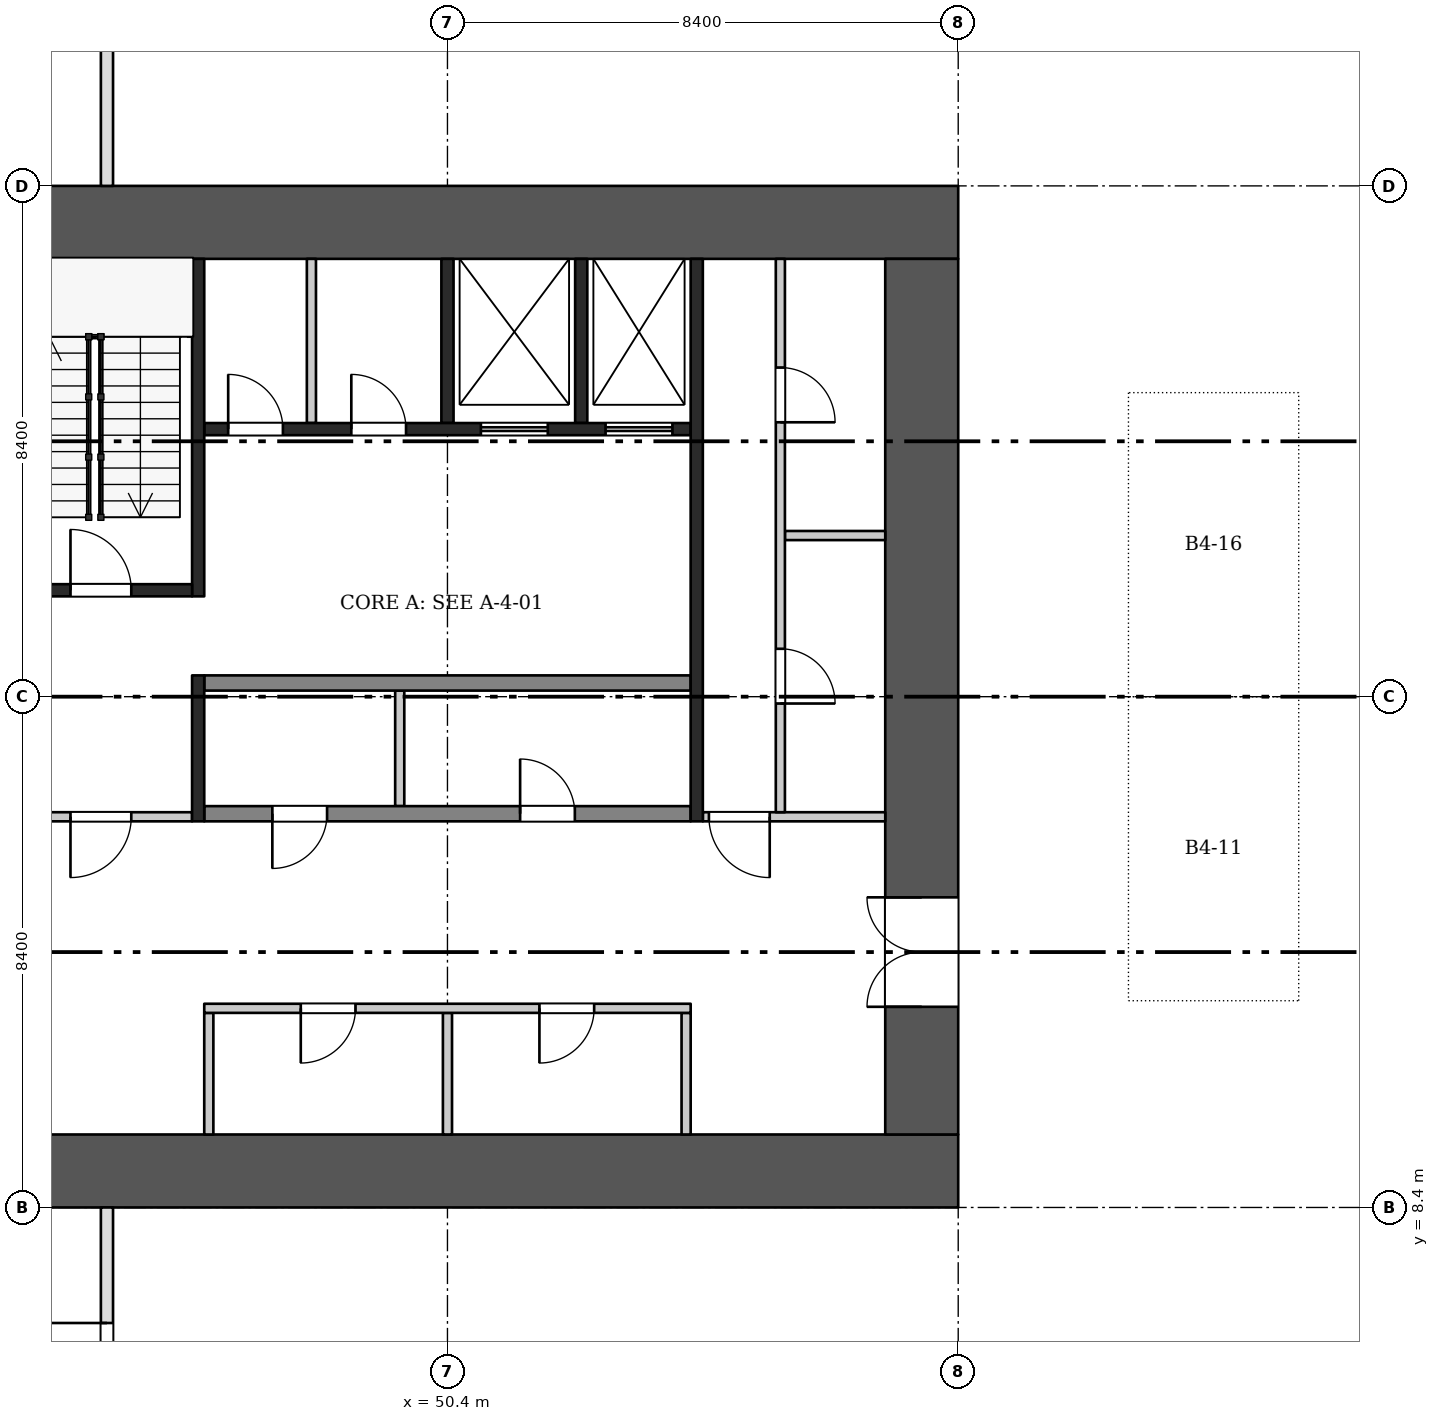
"""IFC4 building model, lengths in metres.
Left out: names, types, materials, properties, quantities, classifications, styles, units other than length and angle.
Written with IfcOpenShell. Run it as: python <this file> out.ifc"""

import sys

from ifc_helpers import new_model, si_unit, direction, frame, frame_2d, origin, place, context, subcontext, project, spatial, rectangle, extrude, element, fill, save


model = new_model("IFC4")
c1 = context("Model", 3, precision=1e-05, world=origin(), true_north=direction((0.0, 1.0)))
c2 = subcontext(c1, "Body", "Model", "MODEL_VIEW")
j1 = project(units=[si_unit("LENGTHUNIT", "METRE"), si_unit("PLANEANGLEUNIT", "RADIAN")], contexts=[c1])
p1 = place(None, origin())
s1 = spatial("IfcSite", under=j1, at=p1, CompositionType="ELEMENT")
p2 = place(p1, origin())
s2 = spatial("IfcBuilding", under=s1, at=p2, CompositionType="ELEMENT")
p3 = place(p2, frame((0.0, 0.0, -16.0)))
s3 = spatial("IfcBuildingStorey", under=s2, at=p3, CompositionType="ELEMENT", Elevation=-16.0)
for number, where, z_axis, x_axis in (
    (1, (42.0, 9.0, 0.0), (0.0, 0.0, 1.0), (1.0, 0.0, 0.0)),
    (2, (42.0, 24.6, 0.0), (0.0, 0.0, 1.0), (1.0, 0.0, 0.0)),
):
    element("IfcWall", number, at=place(p3, frame(where, z_axis=z_axis, x_axis=x_axis)), inside=s3, PredefinedType="SHEAR", context=c2, shape_type="SweptSolid", body=[
        extrude(rectangle(XDim=16.8, YDim=1.2, at=frame_2d((8.4, 0.0))), origin(), (0.0, 0.0, 1.0), 3.7),
    ])
p4 = place(p3, frame((58.2, 9.6, 0.0), z_axis=(0.0, 0.0, 1.0), x_axis=(0.0, 1.0, 0.0)))
e3 = element("IfcWall", 3, at=p4, inside=s3, PredefinedType="SHEAR", context=c2, shape_type="SweptSolid", body=[
    extrude(rectangle(XDim=14.4, YDim=1.2, at=frame_2d((7.2, 0.0))), origin(), (0.0, 0.0, 1.0), 3.7),
])
p5 = place(p4, frame((2.1, 0.0, 0.0)))
e4 = element("IfcOpeningElement", 4, at=p5, cuts=e3, PredefinedType="OPENING", context=c2, shape_type="SweptSolid", body=[
    extrude(rectangle(XDim=1.8, YDim=2.1, at=frame_2d((0.9, 1.05))), frame((0.0, 0.61, 0.0), z_axis=(0.0, -1.0, 0.0), x_axis=(1.0, 0.0, 0.0)), (0.0, 0.0, 1.0), 1.22),
])
for number, where, z_axis, x_axis in (
    (5, (46.475, 9.6, 0.0), (0.0, 0.0, 1.0), (0.0, 1.0, 0.0)),
    (6, (54.325, 9.6, 0.0), (0.0, 0.0, 1.0), (0.0, 1.0, 0.0)),
    (7, (50.4, 9.6, 0.0), (0.0, 0.0, 1.0), (0.0, 1.0, 0.0)),
):
    element("IfcWall", number, at=place(p3, frame(where, z_axis=z_axis, x_axis=x_axis)), inside=s3, PredefinedType="PARTITIONING", context=c2, shape_type="SweptSolid", body=[
        extrude(rectangle(XDim=2.0, YDim=0.15, at=frame_2d((1.0, 0.0))), origin(), (0.0, 0.0, 1.0), 3.7),
    ])
p6 = place(p3, frame((46.4, 11.675, 0.0), z_axis=(0.0, 0.0, 1.0), x_axis=(1.0, 0.0, 0.0)))
e8 = element("IfcWall", 8, at=p6, inside=s3, PredefinedType="PARTITIONING", context=c2, shape_type="SweptSolid", body=[
    extrude(rectangle(XDim=8.0, YDim=0.15, at=frame_2d((4.0, 0.0))), origin(), (0.0, 0.0, 1.0), 3.7),
])
p7 = place(p6, frame((1.587, 0.0, 0.0)))
e9 = element("IfcOpeningElement", 9, at=p7, cuts=e8, PredefinedType="OPENING", context=c2, shape_type="SweptSolid", body=[
    extrude(rectangle(XDim=0.9, YDim=2.1, at=frame_2d((0.45, 1.05))), frame((0.0, 0.085, 0.0), z_axis=(0.0, -1.0, 0.0), x_axis=(1.0, 0.0, 0.0)), (0.0, 0.0, 1.0), 0.17),
])
p8 = place(p6, frame((5.512, 0.0, 0.0)))
e10 = element("IfcOpeningElement", 10, at=p8, cuts=e8, PredefinedType="OPENING", context=c2, shape_type="SweptSolid", body=[
    extrude(rectangle(XDim=0.9, YDim=2.1, at=frame_2d((0.45, 1.05))), frame((0.0, 0.085, 0.0), z_axis=(0.0, -1.0, 0.0), x_axis=(1.0, 0.0, 0.0)), (0.0, 0.0, 1.0), 0.17),
])
p9 = place(p3, frame((49.615, 15.0, 0.0), z_axis=(0.0, 0.0, 1.0), x_axis=(0.0, 1.0, 0.0)))
e11 = element("IfcWall", 11, at=p9, inside=s3, PredefinedType="PARTITIONING", context=c2, shape_type="SweptSolid", body=[
    extrude(rectangle(XDim=1.9, YDim=0.15, at=frame_2d((0.95, 0.0))), origin(), (0.0, 0.0, 1.0), 3.7),
])
p10 = place(p3, frame((46.4, 14.875, 0.0), z_axis=(0.0, 0.0, 1.0), x_axis=(1.0, 0.0, 0.0)))
e12 = element("IfcWall", 12, at=p10, inside=s3, PredefinedType="SHEAR", context=c2, shape_type="SweptSolid", body=[
    extrude(rectangle(XDim=8.0, YDim=0.25, at=frame_2d((4.0, 0.0))), origin(), (0.0, 0.0, 1.0), 3.7),
])
p11 = place(p10, frame((1.12, 0.0, 0.0)))
e13 = element("IfcOpeningElement", 13, at=p11, cuts=e12, PredefinedType="OPENING", context=c2, shape_type="SweptSolid", body=[
    extrude(rectangle(XDim=0.9, YDim=2.1, at=frame_2d((0.45, 1.05))), frame((0.0, 0.135, 0.0), z_axis=(0.0, -1.0, 0.0), x_axis=(1.0, 0.0, 0.0)), (0.0, 0.0, 1.0), 0.27),
])
p12 = place(p10, frame((5.195, 0.0, 0.0)))
e14 = element("IfcOpeningElement", 14, at=p12, cuts=e12, PredefinedType="OPENING", context=c2, shape_type="SweptSolid", body=[
    extrude(rectangle(XDim=0.9, YDim=2.1, at=frame_2d((0.45, 1.05))), frame((0.0, 0.135, 0.0), z_axis=(0.0, -1.0, 0.0), x_axis=(1.0, 0.0, 0.0)), (0.0, 0.0, 1.0), 0.27),
])
p13 = place(p3, frame((46.4, 17.025, 0.0), z_axis=(0.0, 0.0, 1.0), x_axis=(1.0, 0.0, 0.0)))
e15 = element("IfcWall", 15, at=p13, inside=s3, PredefinedType="SHEAR", context=c2, shape_type="SweptSolid", body=[
    extrude(rectangle(XDim=8.0, YDim=0.25, at=frame_2d((4.0, 0.0))), origin(), (0.0, 0.0, 1.0), 3.7),
])
for number, where, z_axis, x_axis in (
    (16, (50.4, 21.3, 0.0), (0.0, 0.0, 1.0), (0.0, 1.0, 0.0)),
    (17, (52.6, 21.3, 0.0), (0.0, 0.0, 1.0), (0.0, 1.0, 0.0)),
):
    element("IfcWall", number, at=place(p3, frame(where, z_axis=z_axis, x_axis=x_axis)), inside=s3, PredefinedType="SHEAR", context=c2, shape_type="SweptSolid", body=[
        extrude(rectangle(XDim=2.7, YDim=0.2, at=frame_2d((1.35, 0.0))), origin(), (0.0, 0.0, 1.0), 3.7),
    ])
p14 = place(p3, frame((48.163, 21.3, 0.0), z_axis=(0.0, 0.0, 1.0), x_axis=(0.0, 1.0, 0.0)))
e18 = element("IfcWall", 18, at=p14, inside=s3, PredefinedType="PARTITIONING", context=c2, shape_type="SweptSolid", body=[
    extrude(rectangle(XDim=2.7, YDim=0.15, at=frame_2d((1.35, 0.0))), origin(), (0.0, 0.0, 1.0), 3.7),
])
p15 = place(p3, frame((46.4, 21.2, 0.0), z_axis=(0.0, 0.0, 1.0), x_axis=(1.0, 0.0, 0.0)))
e19 = element("IfcWall", 19, at=p15, inside=s3, PredefinedType="SHEAR", context=c2, shape_type="SweptSolid", body=[
    extrude(rectangle(XDim=8.0, YDim=0.2, at=frame_2d((4.0, 0.0))), origin(), (0.0, 0.0, 1.0), 3.7),
])
p16 = place(p15, frame((0.394, 0.0, 0.0)))
e20 = element("IfcOpeningElement", 20, at=p16, cuts=e19, PredefinedType="OPENING", context=c2, shape_type="SweptSolid", body=[
    extrude(rectangle(XDim=0.9, YDim=2.1, at=frame_2d((0.45, 1.05))), frame((0.0, 0.11, 0.0), z_axis=(0.0, -1.0, 0.0), x_axis=(1.0, 0.0, 0.0)), (0.0, 0.0, 1.0), 0.22),
])
p17 = place(p15, frame((2.419, 0.0, 0.0)))
e21 = element("IfcOpeningElement", 21, at=p17, cuts=e19, PredefinedType="OPENING", context=c2, shape_type="SweptSolid", body=[
    extrude(rectangle(XDim=0.9, YDim=2.1, at=frame_2d((0.45, 1.05))), frame((0.0, 0.11, 0.0), z_axis=(0.0, -1.0, 0.0), x_axis=(1.0, 0.0, 0.0)), (0.0, 0.0, 1.0), 0.22),
])
p18 = place(p15, frame((4.55, 0.0, 0.0)))
e22 = element("IfcOpeningElement", 22, at=p18, cuts=e19, PredefinedType="OPENING", context=c2, shape_type="SweptSolid", body=[
    extrude(rectangle(XDim=1.1, YDim=2.1, at=frame_2d((0.55, 1.05))), frame((0.0, 0.11, 0.0), z_axis=(0.0, -1.0, 0.0), x_axis=(1.0, 0.0, 0.0)), (0.0, 0.0, 1.0), 0.22),
])
p19 = place(p15, frame((6.6, 0.0, 0.0)))
e23 = element("IfcOpeningElement", 23, at=p19, cuts=e19, PredefinedType="OPENING", context=c2, shape_type="SweptSolid", body=[
    extrude(rectangle(XDim=1.1, YDim=2.1, at=frame_2d((0.55, 1.05))), frame((0.0, 0.11, 0.0), z_axis=(0.0, -1.0, 0.0), x_axis=(1.0, 0.0, 0.0)), (0.0, 0.0, 1.0), 0.22),
])
p20 = place(p3, frame((46.3, 14.75, 0.0), z_axis=(0.0, 0.0, 1.0), x_axis=(0.0, 1.0, 0.0)))
e24 = element("IfcWall", 24, at=p20, inside=s3, PredefinedType="SHEAR", context=c2, shape_type="SweptSolid", body=[
    extrude(rectangle(XDim=2.4, YDim=0.2, at=frame_2d((1.2, 0.0))), origin(), (0.0, 0.0, 1.0), 3.7),
])
p21 = place(p3, frame((46.3, 18.45, 0.0), z_axis=(0.0, 0.0, 1.0), x_axis=(0.0, 1.0, 0.0)))
e25 = element("IfcWall", 25, at=p21, inside=s3, PredefinedType="SHEAR", context=c2, shape_type="SweptSolid", body=[
    extrude(rectangle(XDim=5.55, YDim=0.2, at=frame_2d((2.775, 0.0))), origin(), (0.0, 0.0, 1.0), 3.7),
])
p22 = place(p3, frame((43.2, 14.825, 0.0), z_axis=(0.0, 0.0, 1.0), x_axis=(1.0, 0.0, 0.0)))
e26 = element("IfcWall", 26, at=p22, inside=s3, PredefinedType="PARTITIONING", context=c2, shape_type="SweptSolid", body=[
    extrude(rectangle(XDim=3.0, YDim=0.15, at=frame_2d((1.5, 0.0))), origin(), (0.0, 0.0, 1.0), 3.7),
])
p23 = place(p22, frame((1.0, 0.0, 0.0)))
e27 = element("IfcOpeningElement", 27, at=p23, cuts=e26, PredefinedType="OPENING", context=c2, shape_type="SweptSolid", body=[
    extrude(rectangle(XDim=1.0, YDim=2.1, at=frame_2d((0.5, 1.05))), frame((0.0, 0.085, 0.0), z_axis=(0.0, -1.0, 0.0), x_axis=(1.0, 0.0, 0.0)), (0.0, 0.0, 1.0), 0.17),
])
p24 = place(p3, frame((43.2, 18.55, 0.0), z_axis=(0.0, 0.0, 1.0), x_axis=(1.0, 0.0, 0.0)))
e28 = element("IfcWall", 28, at=p24, inside=s3, PredefinedType="SHEAR", context=c2, shape_type="SweptSolid", body=[
    extrude(rectangle(XDim=3.0, YDim=0.2, at=frame_2d((1.5, 0.0))), origin(), (0.0, 0.0, 1.0), 3.7),
])
p25 = place(p24, frame((1.0, 0.0, 0.0)))
e29 = element("IfcOpeningElement", 29, at=p25, cuts=e28, PredefinedType="OPENING", context=c2, shape_type="SweptSolid", body=[
    extrude(rectangle(XDim=1.0, YDim=2.1, at=frame_2d((0.5, 1.05))), frame((0.0, 0.11, 0.0), z_axis=(0.0, -1.0, 0.0), x_axis=(1.0, 0.0, 0.0)), (0.0, 0.0, 1.0), 0.22),
])
p26 = place(p3, frame((54.5, 14.75, 0.0), z_axis=(0.0, 0.0, 1.0), x_axis=(0.0, 1.0, 0.0)))
e30 = element("IfcWall", 30, at=p26, inside=s3, PredefinedType="SHEAR", context=c2, shape_type="SweptSolid", body=[
    extrude(rectangle(XDim=9.25, YDim=0.2, at=frame_2d((4.625, 0.0))), origin(), (0.0, 0.0, 1.0), 3.7),
])
p27 = place(p3, frame((54.6, 14.825, 0.0), z_axis=(0.0, 0.0, 1.0), x_axis=(1.0, 0.0, 0.0)))
e31 = element("IfcWall", 31, at=p27, inside=s3, PredefinedType="PARTITIONING", context=c2, shape_type="SweptSolid", body=[
    extrude(rectangle(XDim=3.0, YDim=0.15, at=frame_2d((1.5, 0.0))), origin(), (0.0, 0.0, 1.0), 3.7),
])
p28 = place(p27, frame((0.1, 0.0, 0.0)))
e32 = element("IfcOpeningElement", 32, at=p28, cuts=e31, PredefinedType="OPENING", context=c2, shape_type="SweptSolid", body=[
    extrude(rectangle(XDim=1.0, YDim=2.1, at=frame_2d((0.5, 1.05))), frame((0.0, 0.085, 0.0), z_axis=(0.0, -1.0, 0.0), x_axis=(1.0, 0.0, 0.0)), (0.0, 0.0, 1.0), 0.17),
])
p29 = place(p3, frame((55.95, 19.45, 0.0), z_axis=(0.0, 0.0, 1.0), x_axis=(1.0, 0.0, 0.0)))
e33 = element("IfcWall", 33, at=p29, inside=s3, PredefinedType="PARTITIONING", context=c2, shape_type="SweptSolid", body=[
    extrude(rectangle(XDim=1.65, YDim=0.15, at=frame_2d((0.825, 0.0))), origin(), (0.0, 0.0, 1.0), 3.7),
])
p30 = place(p3, frame((55.875, 14.9, 0.0), z_axis=(0.0, 0.0, 1.0), x_axis=(0.0, 1.0, 0.0)))
e34 = element("IfcWall", 34, at=p30, inside=s3, PredefinedType="PARTITIONING", context=c2, shape_type="SweptSolid", body=[
    extrude(rectangle(XDim=9.1, YDim=0.15, at=frame_2d((4.55, 0.0))), origin(), (0.0, 0.0, 1.0), 3.7),
])
p31 = place(p30, frame((1.788, 0.0, 0.0)))
e35 = element("IfcOpeningElement", 35, at=p31, cuts=e34, PredefinedType="OPENING", context=c2, shape_type="SweptSolid", body=[
    extrude(rectangle(XDim=0.9, YDim=2.1, at=frame_2d((0.45, 1.05))), frame((0.0, 0.085, 0.0), z_axis=(0.0, -1.0, 0.0), x_axis=(1.0, 0.0, 0.0)), (0.0, 0.0, 1.0), 0.17),
])
p32 = place(p30, frame((6.413, 0.0, 0.0)))
e36 = element("IfcOpeningElement", 36, at=p32, cuts=e34, PredefinedType="OPENING", context=c2, shape_type="SweptSolid", body=[
    extrude(rectangle(XDim=0.9, YDim=2.1, at=frame_2d((0.45, 1.05))), frame((0.0, 0.085, 0.0), z_axis=(0.0, -1.0, 0.0), x_axis=(1.0, 0.0, 0.0)), (0.0, 0.0, 1.0), 0.17),
])
p33 = place(p3, frame((44.8, 5.0, 0.0), z_axis=(0.0, 0.0, 1.0), x_axis=(0.0, 1.0, 0.0)))
e37 = element("IfcWall", 37, at=p33, inside=s3, PredefinedType="PARTITIONING", context=c2, shape_type="SweptSolid", body=[
    extrude(rectangle(XDim=3.4, YDim=0.2, at=frame_2d((1.7, 0.0))), origin(), (0.0, 0.0, 1.0), 3.7),
])
p34 = place(p33, frame((0.5, 0.0, 0.0)))
e38 = element("IfcOpeningElement", 38, at=p34, cuts=e37, PredefinedType="OPENING", context=c2, shape_type="SweptSolid", body=[
    extrude(rectangle(XDim=1.0, YDim=2.1, at=frame_2d((0.5, 1.05))), frame((0.0, 0.11, 0.0), z_axis=(0.0, -1.0, 0.0), x_axis=(1.0, 0.0, 0.0)), (0.0, 0.0, 1.0), 0.22),
])
p35 = place(p3, frame((44.8, 25.2, 0.0), z_axis=(0.0, 0.0, 1.0), x_axis=(0.0, 1.0, 0.0)))
e39 = element("IfcWall", 39, at=p35, inside=s3, PredefinedType="PARTITIONING", context=c2, shape_type="SweptSolid", body=[
    extrude(rectangle(XDim=3.4, YDim=0.2, at=frame_2d((1.7, 0.0))), origin(), (0.0, 0.0, 1.0), 3.7),
])
p36 = place(p5, origin())
e40 = element("IfcDoor", 40, at=p36, inside=s3, OperationType="DOUBLE_DOOR_SINGLE_SWING", PredefinedType="DOOR", context=c2, shape_type="SweptSolid", body=[
    extrude(rectangle(XDim=1.8, YDim=2.1, at=frame_2d((0.9, 1.05))), frame((0.0, 0.025, 0.0), z_axis=(0.0, -1.0, 0.0), x_axis=(1.0, 0.0, 0.0)), (0.0, 0.0, 1.0), 0.05),
])
fill(e4, e40)
p37 = place(p7, frame((0.9, 0.0, 0.0), z_axis=(0.0, 0.0, 1.0), x_axis=(-1.0, 0.0, 0.0)))
e41 = element("IfcDoor", 41, at=p37, inside=s3, OperationType="SINGLE_SWING_RIGHT", PredefinedType="DOOR", context=c2, shape_type="SweptSolid", body=[
    extrude(rectangle(XDim=0.9, YDim=2.1, at=frame_2d((0.45, 1.05))), frame((0.0, 0.025, 0.0), z_axis=(0.0, -1.0, 0.0), x_axis=(1.0, 0.0, 0.0)), (0.0, 0.0, 1.0), 0.05),
])
fill(e9, e41)
p38 = place(p8, frame((0.9, 0.0, 0.0), z_axis=(0.0, 0.0, 1.0), x_axis=(-1.0, 0.0, 0.0)))
e42 = element("IfcDoor", 42, at=p38, inside=s3, OperationType="SINGLE_SWING_RIGHT", PredefinedType="DOOR", context=c2, shape_type="SweptSolid", body=[
    extrude(rectangle(XDim=0.9, YDim=2.1, at=frame_2d((0.45, 1.05))), frame((0.0, 0.025, 0.0), z_axis=(0.0, -1.0, 0.0), x_axis=(1.0, 0.0, 0.0)), (0.0, 0.0, 1.0), 0.05),
])
fill(e10, e42)
p39 = place(p11, frame((0.9, 0.0, 0.0), z_axis=(0.0, 0.0, 1.0), x_axis=(-1.0, 0.0, 0.0)))
e43 = element("IfcDoor", 43, at=p39, inside=s3, OperationType="SINGLE_SWING_RIGHT", PredefinedType="DOOR", context=c2, shape_type="SweptSolid", body=[
    extrude(rectangle(XDim=0.9, YDim=2.1, at=frame_2d((0.45, 1.05))), frame((0.0, 0.025, 0.0), z_axis=(0.0, -1.0, 0.0), x_axis=(1.0, 0.0, 0.0)), (0.0, 0.0, 1.0), 0.05),
])
fill(e13, e43)
p40 = place(p12, origin())
e44 = element("IfcDoor", 44, at=p40, inside=s3, OperationType="SINGLE_SWING_LEFT", PredefinedType="DOOR", context=c2, shape_type="SweptSolid", body=[
    extrude(rectangle(XDim=0.9, YDim=2.1, at=frame_2d((0.45, 1.05))), frame((0.0, 0.025, 0.0), z_axis=(0.0, -1.0, 0.0), x_axis=(1.0, 0.0, 0.0)), (0.0, 0.0, 1.0), 0.05),
])
fill(e14, e44)
p41 = place(p16, origin())
e45 = element("IfcDoor", 45, at=p41, inside=s3, OperationType="SINGLE_SWING_LEFT", PredefinedType="DOOR", context=c2, shape_type="SweptSolid", body=[
    extrude(rectangle(XDim=0.9, YDim=2.1, at=frame_2d((0.45, 1.05))), frame((0.0, 0.025, 0.0), z_axis=(0.0, -1.0, 0.0), x_axis=(1.0, 0.0, 0.0)), (0.0, 0.0, 1.0), 0.05),
])
fill(e20, e45)
p42 = place(p17, origin())
e46 = element("IfcDoor", 46, at=p42, inside=s3, OperationType="SINGLE_SWING_LEFT", PredefinedType="DOOR", context=c2, shape_type="SweptSolid", body=[
    extrude(rectangle(XDim=0.9, YDim=2.1, at=frame_2d((0.45, 1.05))), frame((0.0, 0.025, 0.0), z_axis=(0.0, -1.0, 0.0), x_axis=(1.0, 0.0, 0.0)), (0.0, 0.0, 1.0), 0.05),
])
fill(e21, e46)
p43 = place(p18, origin())
e47 = element("IfcDoor", 47, at=p43, inside=s3, OperationType="DOUBLE_DOOR_SLIDING", PredefinedType="DOOR", context=c2, shape_type="SweptSolid", body=[
    extrude(rectangle(XDim=1.1, YDim=2.1, at=frame_2d((0.55, 1.05))), frame((0.0, 0.025, 0.0), z_axis=(0.0, -1.0, 0.0), x_axis=(1.0, 0.0, 0.0)), (0.0, 0.0, 1.0), 0.05),
])
fill(e22, e47)
p44 = place(p19, origin())
e48 = element("IfcDoor", 48, at=p44, inside=s3, OperationType="DOUBLE_DOOR_SLIDING", PredefinedType="DOOR", context=c2, shape_type="SweptSolid", body=[
    extrude(rectangle(XDim=1.1, YDim=2.1, at=frame_2d((0.55, 1.05))), frame((0.0, 0.025, 0.0), z_axis=(0.0, -1.0, 0.0), x_axis=(1.0, 0.0, 0.0)), (0.0, 0.0, 1.0), 0.05),
])
fill(e23, e48)
p45 = place(p23, frame((1.0, 0.0, 0.0), z_axis=(0.0, 0.0, 1.0), x_axis=(-1.0, 0.0, 0.0)))
e49 = element("IfcDoor", 49, at=p45, inside=s3, OperationType="SINGLE_SWING_RIGHT", PredefinedType="DOOR", context=c2, shape_type="SweptSolid", body=[
    extrude(rectangle(XDim=1.0, YDim=2.1, at=frame_2d((0.5, 1.05))), frame((0.0, 0.025, 0.0), z_axis=(0.0, -1.0, 0.0), x_axis=(1.0, 0.0, 0.0)), (0.0, 0.0, 1.0), 0.05),
])
fill(e27, e49)
p46 = place(p25, origin())
e50 = element("IfcDoor", 50, at=p46, inside=s3, OperationType="SINGLE_SWING_LEFT", PredefinedType="DOOR", context=c2, shape_type="SweptSolid", body=[
    extrude(rectangle(XDim=1.0, YDim=2.1, at=frame_2d((0.5, 1.05))), frame((0.0, 0.025, 0.0), z_axis=(0.0, -1.0, 0.0), x_axis=(1.0, 0.0, 0.0)), (0.0, 0.0, 1.0), 0.05),
])
fill(e29, e50)
p47 = place(p28, frame((1.0, 0.0, 0.0), z_axis=(0.0, 0.0, 1.0), x_axis=(-1.0, 0.0, 0.0)))
e51 = element("IfcDoor", 51, at=p47, inside=s3, OperationType="SINGLE_SWING_LEFT", PredefinedType="DOOR", context=c2, shape_type="SweptSolid", body=[
    extrude(rectangle(XDim=1.0, YDim=2.1, at=frame_2d((0.5, 1.05))), frame((0.0, 0.025, 0.0), z_axis=(0.0, -1.0, 0.0), x_axis=(1.0, 0.0, 0.0)), (0.0, 0.0, 1.0), 0.05),
])
fill(e32, e51)
p48 = place(p31, frame((0.9, 0.0, 0.0), z_axis=(0.0, 0.0, 1.0), x_axis=(-1.0, 0.0, 0.0)))
e52 = element("IfcDoor", 52, at=p48, inside=s3, OperationType="SINGLE_SWING_RIGHT", PredefinedType="DOOR", context=c2, shape_type="SweptSolid", body=[
    extrude(rectangle(XDim=0.9, YDim=2.1, at=frame_2d((0.45, 1.05))), frame((0.0, 0.025, 0.0), z_axis=(0.0, -1.0, 0.0), x_axis=(1.0, 0.0, 0.0)), (0.0, 0.0, 1.0), 0.05),
])
fill(e35, e52)
p49 = place(p32, frame((0.9, 0.0, 0.0), z_axis=(0.0, 0.0, 1.0), x_axis=(-1.0, 0.0, 0.0)))
e53 = element("IfcDoor", 53, at=p49, inside=s3, OperationType="SINGLE_SWING_RIGHT", PredefinedType="DOOR", context=c2, shape_type="SweptSolid", body=[
    extrude(rectangle(XDim=0.9, YDim=2.1, at=frame_2d((0.45, 1.05))), frame((0.0, 0.025, 0.0), z_axis=(0.0, -1.0, 0.0), x_axis=(1.0, 0.0, 0.0)), (0.0, 0.0, 1.0), 0.05),
])
fill(e36, e53)
p50 = place(p34, origin())
e54 = element("IfcDoor", 54, at=p50, inside=s3, OperationType="SINGLE_SWING_RIGHT", PredefinedType="DOOR", context=c2, shape_type="SweptSolid", body=[
    extrude(rectangle(XDim=1.0, YDim=2.1, at=frame_2d((0.5, 1.05))), frame((0.0, 0.025, 0.0), z_axis=(0.0, -1.0, 0.0), x_axis=(1.0, 0.0, 0.0)), (0.0, 0.0, 1.0), 0.05),
])
fill(e38, e54)
save(model, sys.argv[1])
